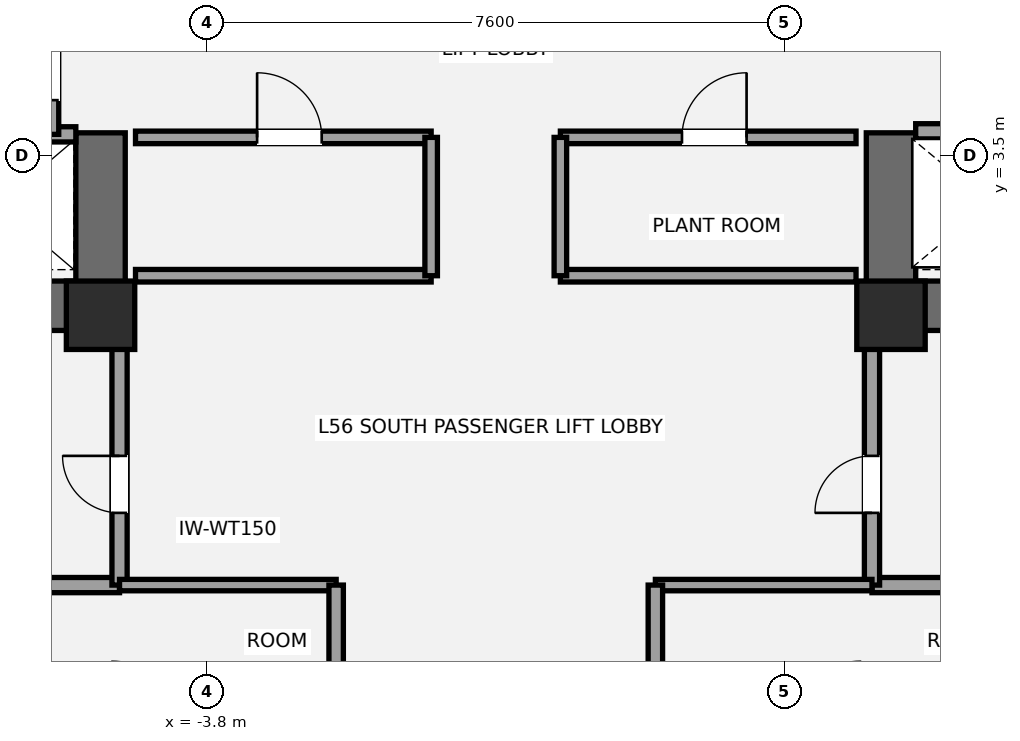
"""IFC4 building model, lengths in metres.
Left out: names, types, materials, properties, quantities, classifications, styles, units other than length and angle.
Written with IfcOpenShell. Run it as: python <this file> out.ifc"""

import sys

from ifc_helpers import new_model, si_unit, direction, frame, frame_2d, origin, origin_2d, place, context, subcontext, project, spatial, rectangle, extrude, element, fill, save


model = new_model("IFC4")
c1 = context("Model", 3, precision=1e-05, world=origin(), true_north=direction((0.0, 1.0)))
c2 = subcontext(c1, "Body", "Model", "MODEL_VIEW")
j1 = project(units=[si_unit("LENGTHUNIT", "METRE"), si_unit("PLANEANGLEUNIT", "RADIAN")], contexts=[c1])
p1 = place(None, origin())
s1 = spatial("IfcSite", under=j1, at=p1, CompositionType="ELEMENT")
p2 = place(p1, origin())
s2 = spatial("IfcBuilding", under=s1, at=p2, CompositionType="ELEMENT")
p3 = place(p2, frame((0.0, 0.0, 201.4)))
s3 = spatial("IfcBuildingStorey", under=s2, at=p3, CompositionType="ELEMENT", Elevation=201.4)
p4 = place(p3, frame((-4.875, 1.525, 0.0), z_axis=(0.0, 0.0, 1.0), x_axis=(-1.0, 0.0, 0.0)))
e1 = element("IfcWall", 1, at=p4, inside=s3, PredefinedType="SHEAR", context=c2, shape_type="SweptSolid", body=[
    extrude(rectangle(XDim=8.925, YDim=0.65, at=frame_2d((4.462, 0.0))), origin(), (0.0, 0.0, 1.0), 4.5),
])
p5 = place(p4, frame((5.305, 0.0, 0.0)))
e2 = element("IfcOpeningElement", 2, at=p5, cuts=e1, PredefinedType="OPENING", context=c2, shape_type="SweptSolid", body=[
    extrude(rectangle(XDim=1.05, YDim=2.15, at=frame_2d((0.525, 1.075))), frame((0.0, 0.335, 0.0), z_axis=(0.0, -1.0, 0.0), x_axis=(1.0, 0.0, 0.0)), (0.0, 0.0, 1.0), 0.67),
])
p6 = place(p4, frame((3.755, 0.0, 0.0)))
e3 = element("IfcOpeningElement", 3, at=p6, cuts=e1, PredefinedType="OPENING", context=c2, shape_type="SweptSolid", body=[
    extrude(rectangle(XDim=1.1, YDim=2.2, at=frame_2d((0.55, 1.1))), frame((0.0, 0.335, 0.0), z_axis=(0.0, -1.0, 0.0), x_axis=(1.0, 0.0, 0.0)), (0.0, 0.0, 1.0), 0.67),
])
p7 = place(p3, frame((-5.2, 1.2, 0.0), z_axis=(0.0, 0.0, 1.0), x_axis=(0.0, 1.0, 0.0)))
e4 = element("IfcWall", 4, at=p7, inside=s3, PredefinedType="SHEAR", context=c2, shape_type="SweptSolid", body=[
    extrude(rectangle(XDim=2.6, YDim=0.65, at=frame_2d((1.3, 0.0))), origin(), (0.0, 0.0, 1.0), 4.5),
])
p8 = place(p3, frame((13.8, 1.525, 0.0), z_axis=(0.0, 0.0, 1.0), x_axis=(-1.0, 0.0, 0.0)))
e5 = element("IfcWall", 5, at=p8, inside=s3, PredefinedType="SHEAR", context=c2, shape_type="SweptSolid", body=[
    extrude(rectangle(XDim=8.925, YDim=0.65, at=frame_2d((4.462, 0.0))), origin(), (0.0, 0.0, 1.0), 4.5),
])
p9 = place(p8, frame((2.57, 0.0, 0.0)))
e6 = element("IfcOpeningElement", 6, at=p9, cuts=e5, PredefinedType="OPENING", context=c2, shape_type="SweptSolid", body=[
    extrude(rectangle(XDim=1.05, YDim=2.15, at=frame_2d((0.525, 1.075))), frame((0.0, 0.335, 0.0), z_axis=(0.0, -1.0, 0.0), x_axis=(1.0, 0.0, 0.0)), (0.0, 0.0, 1.0), 0.67),
])
p10 = place(p8, frame((4.45, 0.0, 0.0)))
e7 = element("IfcOpeningElement", 7, at=p10, cuts=e5, PredefinedType="OPENING", context=c2, shape_type="SweptSolid", body=[
    extrude(rectangle(XDim=1.1, YDim=2.2, at=frame_2d((0.55, 1.1))), frame((0.0, 0.335, 0.0), z_axis=(0.0, -1.0, 0.0), x_axis=(1.0, 0.0, 0.0)), (0.0, 0.0, 1.0), 0.67),
])
p11 = place(p3, frame((5.2, 1.2, 0.0), z_axis=(0.0, 0.0, 1.0), x_axis=(0.0, 1.0, 0.0)))
e8 = element("IfcWall", 8, at=p11, inside=s3, PredefinedType="SHEAR", context=c2, shape_type="SweptSolid", body=[
    extrude(rectangle(XDim=2.6, YDim=0.65, at=frame_2d((1.3, 0.0))), origin(), (0.0, 0.0, 1.0), 4.5),
])
for number, where, z_axis, x_axis in (
    (9, (-5.2, 1.4, 0.0), (0.0, 0.0, 1.0), (1.0, 0.0, 0.0)),
    (10, (5.2, 1.4, 0.0), (0.0, 0.0, 1.0), (1.0, 0.0, 0.0)),
):
    element("IfcColumn", number, at=place(p3, frame(where, z_axis=z_axis, x_axis=x_axis)), inside=s3, PredefinedType="COLUMN", context=c2, shape_type="SweptSolid", body=[
        extrude(rectangle(XDim=0.9, YDim=0.9, at=origin_2d()), origin(), (0.0, 0.0, 1.0), 4.5),
    ])
p12 = place(p3, frame((-7.2, -2.15, 0.0), z_axis=(0.0, 0.0, 1.0), x_axis=(1.0, 0.0, 0.0)))
e11 = element("IfcWall", 11, at=p12, inside=s3, PredefinedType="SOLIDWALL", context=c2, shape_type="SweptSolid", body=[
    extrude(rectangle(XDim=2.25, YDim=0.2, at=frame_2d((1.125, 0.0))), origin(), (0.0, 0.0, 1.0), 2.47),
])
p13 = place(p3, frame((-4.95, -2.15, 0.0), z_axis=(0.0, 0.0, 1.0), x_axis=(0.0, 1.0, 0.0)))
e12 = element("IfcWall", 12, at=p13, inside=s3, PredefinedType="SOLIDWALL", context=c2, shape_type="SweptSolid", body=[
    extrude(rectangle(XDim=3.4, YDim=0.2, at=frame_2d((1.7, 0.0))), origin(), (0.0, 0.0, 1.0), 2.47),
])
p14 = place(p13, frame((0.95, 0.0, 0.0)))
e13 = element("IfcOpeningElement", 13, at=p14, cuts=e12, PredefinedType="OPENING", context=c2, shape_type="SweptSolid", body=[
    extrude(rectangle(XDim=0.75, YDim=2.1, at=frame_2d((0.375, 1.05))), frame((0.0, 0.11, 0.0), z_axis=(0.0, -1.0, 0.0), x_axis=(1.0, 0.0, 0.0)), (0.0, 0.0, 1.0), 0.22),
])
p15 = place(p3, frame((4.95, -2.15, 0.0), z_axis=(0.0, 0.0, 1.0), x_axis=(1.0, 0.0, 0.0)))
e14 = element("IfcWall", 14, at=p15, inside=s3, PredefinedType="SOLIDWALL", context=c2, shape_type="SweptSolid", body=[
    extrude(rectangle(XDim=2.25, YDim=0.2, at=frame_2d((1.125, 0.0))), origin(), (0.0, 0.0, 1.0), 2.47),
])
p16 = place(p3, frame((4.95, -2.15, 0.0), z_axis=(0.0, 0.0, 1.0), x_axis=(0.0, 1.0, 0.0)))
e15 = element("IfcWall", 15, at=p16, inside=s3, PredefinedType="SOLIDWALL", context=c2, shape_type="SweptSolid", body=[
    extrude(rectangle(XDim=3.4, YDim=0.2, at=frame_2d((1.7, 0.0))), origin(), (0.0, 0.0, 1.0), 2.47),
])
p17 = place(p16, frame((0.95, 0.0, 0.0)))
e16 = element("IfcOpeningElement", 16, at=p17, cuts=e15, PredefinedType="OPENING", context=c2, shape_type="SweptSolid", body=[
    extrude(rectangle(XDim=0.75, YDim=2.1, at=frame_2d((0.375, 1.05))), frame((0.0, 0.11, 0.0), z_axis=(0.0, -1.0, 0.0), x_axis=(1.0, 0.0, 0.0)), (0.0, 0.0, 1.0), 0.22),
])
p18 = place(p3, frame((-9.78, 3.78, 0.0), z_axis=(0.0, 0.0, 1.0), x_axis=(1.0, 0.0, 0.0)))
e17 = element("IfcWall", 17, at=p18, inside=s3, PredefinedType="SOLIDWALL", context=c2, shape_type="SweptSolid", body=[
    extrude(rectangle(XDim=4.255, YDim=0.2, at=frame_2d((2.127, 0.0))), origin(), (0.0, 0.0, 1.0), 4.28),
])
p19 = place(p3, frame((-5.85, 3.78, 0.0), z_axis=(0.0, 0.0, 1.0), x_axis=(0.0, 1.0, 0.0)))
e18 = element("IfcWall", 18, at=p19, inside=s3, PredefinedType="SOLIDWALL", context=c2, shape_type="SweptSolid", body=[
    extrude(rectangle(XDim=1.69, YDim=0.2, at=frame_2d((0.845, 0.0))), origin(), (0.0, 0.0, 1.0), 4.28),
])
p20 = place(p19, frame((0.45, 0.0, 0.0)))
e19 = element("IfcOpeningElement", 19, at=p20, cuts=e18, PredefinedType="OPENING", context=c2, shape_type="SweptSolid", body=[
    extrude(rectangle(XDim=0.75, YDim=2.1, at=frame_2d((0.375, 1.05))), frame((0.0, 0.11, 0.0), z_axis=(0.0, -1.0, 0.0), x_axis=(1.0, 0.0, 0.0)), (0.0, 0.0, 1.0), 0.22),
])
p21 = place(p3, frame((5.525, 3.82, 0.0), z_axis=(0.0, 0.0, 1.0), x_axis=(1.0, 0.0, 0.0)))
e20 = element("IfcWall", 20, at=p21, inside=s3, PredefinedType="SOLIDWALL", context=c2, shape_type="SweptSolid", body=[
    extrude(rectangle(XDim=4.255, YDim=0.2, at=frame_2d((2.127, 0.0))), origin(), (0.0, 0.0, 1.0), 4.28),
])
p22 = place(p21, frame((0.65, 0.0, 0.0)))
e21 = element("IfcOpeningElement", 21, at=p22, cuts=e20, PredefinedType="OPENING", context=c2, shape_type="SweptSolid", body=[
    extrude(rectangle(XDim=1.2, YDim=2.2, at=frame_2d((0.6, 1.1))), frame((0.0, 0.11, 0.0), z_axis=(0.0, -1.0, 0.0), x_axis=(1.0, 0.0, 0.0)), (0.0, 0.0, 1.0), 0.22),
])
p23 = place(p3, frame((-4.74, 1.92, 0.0), z_axis=(0.0, 0.0, 1.0), x_axis=(1.0, 0.0, 0.0)))
e22 = element("IfcWall", 22, at=p23, inside=s3, PredefinedType="PARTITIONING", context=c2, shape_type="SweptSolid", body=[
    extrude(rectangle(XDim=3.89, YDim=0.165, at=frame_2d((1.945, 0.0))), origin(), (0.0, 0.0, 1.0), 3.42),
])
p24 = place(p3, frame((-4.74, 3.74, 0.0), z_axis=(0.0, 0.0, 1.0), x_axis=(1.0, 0.0, 0.0)))
e23 = element("IfcWall", 23, at=p24, inside=s3, PredefinedType="PARTITIONING", context=c2, shape_type="SweptSolid", body=[
    extrude(rectangle(XDim=3.89, YDim=0.165, at=frame_2d((1.945, 0.0))), origin(), (0.0, 0.0, 1.0), 4.28),
])
p25 = place(p24, frame((1.6, 0.0, 0.0)))
e24 = element("IfcOpeningElement", 24, at=p25, cuts=e23, PredefinedType="OPENING", context=c2, shape_type="SweptSolid", body=[
    extrude(rectangle(XDim=0.85, YDim=2.1, at=frame_2d((0.425, 1.05))), frame((0.0, 0.093, 0.0), z_axis=(0.0, -1.0, 0.0), x_axis=(1.0, 0.0, 0.0)), (0.0, 0.0, 1.0), 0.185),
])
p26 = place(p3, frame((-0.85, 1.92, 0.0), z_axis=(0.0, 0.0, 1.0), x_axis=(0.0, 1.0, 0.0)))
e25 = element("IfcWall", 25, at=p26, inside=s3, PredefinedType="PARTITIONING", context=c2, shape_type="SweptSolid", body=[
    extrude(rectangle(XDim=1.82, YDim=0.165, at=frame_2d((0.91, 0.0))), origin(), (0.0, 0.0, 1.0), 4.28),
])
p27 = place(p3, frame((0.85, 1.92, 0.0), z_axis=(0.0, 0.0, 1.0), x_axis=(1.0, 0.0, 0.0)))
e26 = element("IfcWall", 26, at=p27, inside=s3, PredefinedType="PARTITIONING", context=c2, shape_type="SweptSolid", body=[
    extrude(rectangle(XDim=3.89, YDim=0.165, at=frame_2d((1.945, 0.0))), origin(), (0.0, 0.0, 1.0), 3.42),
])
p28 = place(p3, frame((0.85, 3.74, 0.0), z_axis=(0.0, 0.0, 1.0), x_axis=(1.0, 0.0, 0.0)))
e27 = element("IfcWall", 27, at=p28, inside=s3, PredefinedType="PARTITIONING", context=c2, shape_type="SweptSolid", body=[
    extrude(rectangle(XDim=3.89, YDim=0.165, at=frame_2d((1.945, 0.0))), origin(), (0.0, 0.0, 1.0), 4.28),
])
p29 = place(p28, frame((1.6, 0.0, 0.0)))
e28 = element("IfcOpeningElement", 28, at=p29, cuts=e27, PredefinedType="OPENING", context=c2, shape_type="SweptSolid", body=[
    extrude(rectangle(XDim=0.85, YDim=2.1, at=frame_2d((0.425, 1.05))), frame((0.0, 0.093, 0.0), z_axis=(0.0, -1.0, 0.0), x_axis=(1.0, 0.0, 0.0)), (0.0, 0.0, 1.0), 0.185),
])
p30 = place(p3, frame((0.85, 1.92, 0.0), z_axis=(0.0, 0.0, 1.0), x_axis=(0.0, 1.0, 0.0)))
e29 = element("IfcWall", 29, at=p30, inside=s3, PredefinedType="PARTITIONING", context=c2, shape_type="SweptSolid", body=[
    extrude(rectangle(XDim=1.82, YDim=0.165, at=frame_2d((0.91, 0.0))), origin(), (0.0, 0.0, 1.0), 4.28),
])
p31 = place(p3, frame((-4.95, -2.15, 0.0), z_axis=(0.0, 0.0, 1.0), x_axis=(1.0, 0.0, 0.0)))
e30 = element("IfcWall", 30, at=p31, inside=s3, PredefinedType="PLUMBINGWALL", context=c2, shape_type="SweptSolid", body=[
    extrude(rectangle(XDim=2.85, YDim=0.15, at=frame_2d((1.425, 0.0))), origin(), (0.0, 0.0, 1.0), 4.28),
])
p32 = place(p3, frame((-2.1, -4.05, 0.0), z_axis=(0.0, 0.0, 1.0), x_axis=(0.0, 1.0, 0.0)))
e31 = element("IfcWall", 31, at=p32, inside=s3, PredefinedType="PLUMBINGWALL", context=c2, shape_type="SweptSolid", body=[
    extrude(rectangle(XDim=1.9, YDim=0.19, at=frame_2d((0.95, 0.0))), origin(), (0.0, 0.0, 1.0), 4.28),
])
p33 = place(p3, frame((2.1, -2.15, 0.0), z_axis=(0.0, 0.0, 1.0), x_axis=(1.0, 0.0, 0.0)))
e32 = element("IfcWall", 32, at=p33, inside=s3, PredefinedType="PLUMBINGWALL", context=c2, shape_type="SweptSolid", body=[
    extrude(rectangle(XDim=2.85, YDim=0.15, at=frame_2d((1.425, 0.0))), origin(), (0.0, 0.0, 1.0), 3.733),
])
p34 = place(p3, frame((2.1, -4.05, 0.0), z_axis=(0.0, 0.0, 1.0), x_axis=(0.0, 1.0, 0.0)))
e33 = element("IfcWall", 33, at=p34, inside=s3, PredefinedType="PLUMBINGWALL", context=c2, shape_type="SweptSolid", body=[
    extrude(rectangle(XDim=1.9, YDim=0.19, at=frame_2d((0.95, 0.0))), origin(), (0.0, 0.0, 1.0), 4.28),
])
p35 = place(p14, origin())
e34 = element("IfcDoor", 34, at=p35, inside=s3, OperationType="SINGLE_SWING_RIGHT", PredefinedType="DOOR", context=c2, shape_type="SweptSolid", body=[
    extrude(rectangle(XDim=0.75, YDim=2.1, at=frame_2d((0.375, 1.05))), frame((0.0, 0.025, 0.0), z_axis=(0.0, -1.0, 0.0), x_axis=(1.0, 0.0, 0.0)), (0.0, 0.0, 1.0), 0.05),
])
fill(e13, e34)
p36 = place(p17, origin())
e35 = element("IfcDoor", 35, at=p36, inside=s3, OperationType="SINGLE_SWING_LEFT", PredefinedType="DOOR", context=c2, shape_type="SweptSolid", body=[
    extrude(rectangle(XDim=0.75, YDim=2.1, at=frame_2d((0.375, 1.05))), frame((0.0, 0.025, 0.0), z_axis=(0.0, -1.0, 0.0), x_axis=(1.0, 0.0, 0.0)), (0.0, 0.0, 1.0), 0.05),
])
fill(e16, e35)
p37 = place(p20, origin())
e36 = element("IfcDoor", 36, at=p37, inside=s3, OperationType="SINGLE_SWING_RIGHT", PredefinedType="DOOR", context=c2, shape_type="SweptSolid", body=[
    extrude(rectangle(XDim=0.75, YDim=2.1, at=frame_2d((0.375, 1.05))), frame((0.0, 0.025, 0.0), z_axis=(0.0, -1.0, 0.0), x_axis=(1.0, 0.0, 0.0)), (0.0, 0.0, 1.0), 0.05),
])
fill(e19, e36)
p38 = place(p25, origin())
e37 = element("IfcDoor", 37, at=p38, inside=s3, OperationType="SINGLE_SWING_LEFT", PredefinedType="DOOR", context=c2, shape_type="SweptSolid", body=[
    extrude(rectangle(XDim=0.85, YDim=2.1, at=frame_2d((0.425, 1.05))), frame((0.0, 0.025, 0.0), z_axis=(0.0, -1.0, 0.0), x_axis=(1.0, 0.0, 0.0)), (0.0, 0.0, 1.0), 0.05),
])
fill(e24, e37)
p39 = place(p29, origin())
e38 = element("IfcDoor", 38, at=p39, inside=s3, OperationType="SINGLE_SWING_RIGHT", PredefinedType="DOOR", context=c2, shape_type="SweptSolid", body=[
    extrude(rectangle(XDim=0.85, YDim=2.1, at=frame_2d((0.425, 1.05))), frame((0.0, 0.025, 0.0), z_axis=(0.0, -1.0, 0.0), x_axis=(1.0, 0.0, 0.0)), (0.0, 0.0, 1.0), 0.05),
])
fill(e28, e38)
save(model, sys.argv[1])
